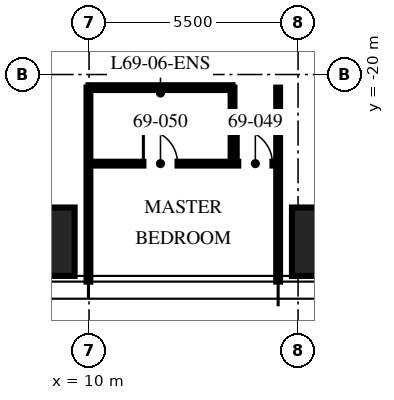
"""IFC4 building model, lengths in metres.
Left out: names, types, materials, properties, quantities, classifications, styles, units other than length and angle.
Written with IfcOpenShell. Run it as: python <this file> out.ifc"""

import sys

from ifc_helpers import new_model, si_unit, direction, frame, frame_2d, origin, origin_2d, place, context, subcontext, project, spatial, rectangle, hollow_rectangle, extrude, element, fill, save


model = new_model("IFC4")
c1 = context("Model", 3, precision=1e-05, world=origin(), true_north=direction((0.0, 1.0)))
c2 = subcontext(c1, "Body", "Model", "MODEL_VIEW")
j1 = project(units=[si_unit("LENGTHUNIT", "METRE"), si_unit("PLANEANGLEUNIT", "RADIAN")], contexts=[c1])
p1 = place(None, origin())
s1 = spatial("IfcSite", under=j1, at=p1, CompositionType="ELEMENT")
p2 = place(p1, origin())
s2 = spatial("IfcBuilding", under=s1, at=p2, CompositionType="ELEMENT")
p3 = place(p2, frame((0.0, 0.0, 274.5)))
s3 = spatial("IfcBuildingStorey", under=s2, at=p3, CompositionType="ELEMENT", Elevation=274.5)
p4 = place(p3, frame((16.64, -24.4, 0.0), z_axis=(0.0, 0.0, 1.0), x_axis=(1.0, 0.0, 0.0)))
e1 = element("IfcColumn", 1, at=p4, inside=s3, PredefinedType="COLUMN", context=c2, shape_type="SweptSolid", body=[
    extrude(hollow_rectangle(XDim=2.6, YDim=1.8, WallThickness=0.14, at=origin_2d()), origin(), (0.0, 0.0, 1.0), 2.51),
])
p5 = place(p3, frame((8.32, -24.4, 0.0), z_axis=(0.0, 0.0, 1.0), x_axis=(1.0, 0.0, 0.0)))
e2 = element("IfcColumn", 2, at=p5, inside=s3, PredefinedType="COLUMN", context=c2, shape_type="SweptSolid", body=[
    extrude(hollow_rectangle(XDim=2.6, YDim=1.8, WallThickness=0.14, at=origin_2d()), origin(), (0.0, 0.0, 1.0), 2.64),
])
for number, where, z_axis, x_axis in (
    (3, (9.984, -20.345, 0.0), (0.0, 0.0, 1.0), (0.0, -1.0, 0.0)),
    (4, (14.976, -20.345, 0.0), (0.0, 0.0, 1.0), (0.0, -1.0, 0.0)),
):
    element("IfcWall", number, at=place(p3, frame(where, z_axis=z_axis, x_axis=x_axis)), inside=s3, PredefinedType="PARTITIONING", context=c2, shape_type="SweptSolid", body=[
        extrude(rectangle(XDim=5.105, YDim=0.1, at=frame_2d((2.552, 0.0))), origin(), (0.0, 0.0, 1.0), 2.75),
    ])
p6 = place(p3, frame((9.984, -22.345, 0.0), z_axis=(0.0, 0.0, 1.0), x_axis=(1.0, 0.0, 0.0)))
e5 = element("IfcWall", 5, at=p6, inside=s3, PredefinedType="PARTITIONING", context=c2, shape_type="SweptSolid", body=[
    extrude(rectangle(XDim=4.992, YDim=0.1, at=frame_2d((2.496, 0.0))), origin(), (0.0, 0.0, 1.0), 2.2),
])
p7 = place(p6, frame((3.942, 0.0, 0.0)))
e6 = element("IfcOpeningElement", 6, at=p7, cuts=e5, PredefinedType="OPENING", context=c2, shape_type="SweptSolid", body=[
    extrude(rectangle(XDim=0.9, YDim=2.1, at=frame_2d((0.45, 1.05))), frame((0.0, 0.06, 0.0), z_axis=(0.0, -1.0, 0.0), x_axis=(1.0, 0.0, 0.0)), (0.0, 0.0, 1.0), 0.12),
])
p8 = place(p6, frame((1.446, 0.0, 0.0)))
e7 = element("IfcOpeningElement", 7, at=p8, cuts=e5, PredefinedType="OPENING", context=c2, shape_type="SweptSolid", body=[
    extrude(rectangle(XDim=0.9, YDim=2.1, at=frame_2d((0.45, 1.05))), frame((0.0, 0.06, 0.0), z_axis=(0.0, -1.0, 0.0), x_axis=(1.0, 0.0, 0.0)), (0.0, 0.0, 1.0), 0.12),
])
p9 = place(p3, frame((13.776, -20.345, 0.0), z_axis=(0.0, 0.0, 1.0), x_axis=(0.0, -1.0, 0.0)))
e8 = element("IfcWall", 8, at=p9, inside=s3, PredefinedType="PARTITIONING", context=c2, shape_type="SweptSolid", body=[
    extrude(rectangle(XDim=2.0, YDim=0.1, at=frame_2d((1.0, 0.0))), origin(), (0.0, 0.0, 1.0), 3.4),
])
p10 = place(p3, frame((9.984, -20.345, 0.0), z_axis=(0.0, 0.0, 1.0), x_axis=(1.0, 0.0, 0.0)))
e9 = element("IfcWall", 9, at=p10, inside=s3, PredefinedType="PARTITIONING", context=c2, shape_type="SweptSolid", body=[
    extrude(rectangle(XDim=3.792, YDim=0.125, at=frame_2d((1.896, 0.0))), origin(), (0.0, 0.0, 1.0), 2.2),
])
p11 = place(p7, origin())
e10 = element("IfcDoor", 10, at=p11, inside=s3, OperationType="SINGLE_SWING_LEFT", PredefinedType="DOOR", context=c2, shape_type="SweptSolid", body=[
    extrude(rectangle(XDim=0.9, YDim=2.1, at=frame_2d((0.45, 1.05))), frame((0.0, 0.025, 0.0), z_axis=(0.0, -1.0, 0.0), x_axis=(1.0, 0.0, 0.0)), (0.0, 0.0, 1.0), 0.05),
])
fill(e6, e10)
p12 = place(p8, origin())
e11 = element("IfcDoor", 11, at=p12, inside=s3, OperationType="SINGLE_SWING_LEFT", PredefinedType="DOOR", context=c2, shape_type="SweptSolid", body=[
    extrude(rectangle(XDim=0.9, YDim=2.1, at=frame_2d((0.45, 1.05))), frame((0.0, 0.025, 0.0), z_axis=(0.0, -1.0, 0.0), x_axis=(1.0, 0.0, 0.0)), (0.0, 0.0, 1.0), 0.05),
])
fill(e7, e11)
save(model, sys.argv[1])
